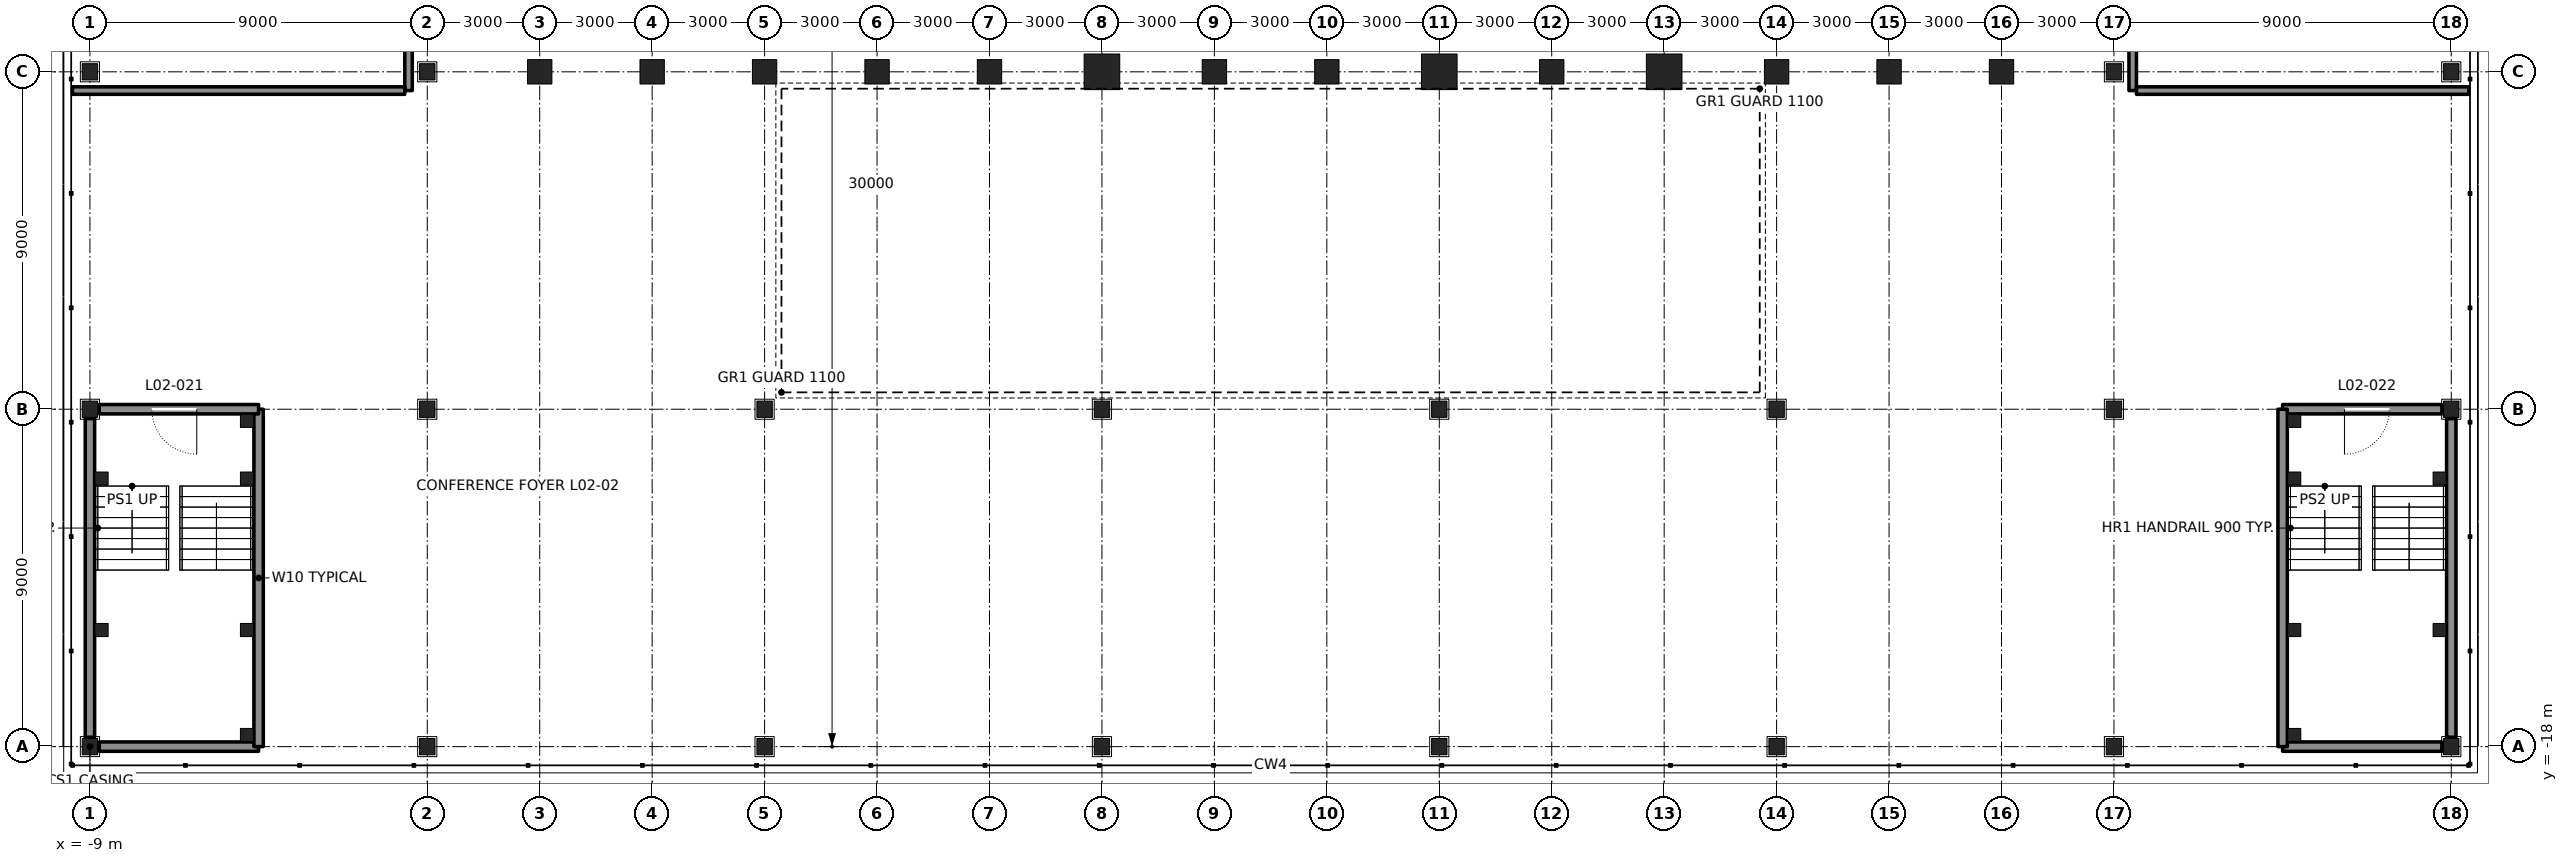
"""IFC4 building model, lengths in metres.
Left out: names, types, materials, properties, quantities, classifications, styles, units other than length and angle.
Written with IfcOpenShell. Run it as: python <this file> out.ifc"""

import sys

from ifc_helpers import new_model, si_unit, direction, frame, frame_2d, origin, origin_2d, place, context, subcontext, project, spatial, rectangle, hollow_rectangle, i_section, extrude, element, fill, save


model = new_model("IFC4")
c1 = context("Model", 3, precision=1e-05, world=origin(), true_north=direction((0.0, 1.0)))
c2 = subcontext(c1, "Body", "Model", "MODEL_VIEW")
j1 = project(units=[si_unit("LENGTHUNIT", "METRE"), si_unit("PLANEANGLEUNIT", "RADIAN")], contexts=[c1])
p1 = place(None, origin())
s1 = spatial("IfcSite", under=j1, at=p1, CompositionType="ELEMENT")
p2 = place(p1, origin())
s2 = spatial("IfcBuilding", under=s1, at=p2, CompositionType="ELEMENT")
p3 = place(p2, frame((0.0, 0.0, 13.5)))
s3 = spatial("IfcBuildingStorey", under=s2, at=p3, CompositionType="ELEMENT", Elevation=13.5)
for number, where, z_axis, x_axis in (
    (1, (3.0, 0.0, 0.0), (0.0, 0.0, 1.0), (0.0, -1.0, 0.0)),
    (2, (6.0, 0.0, 0.0), (0.0, 0.0, 1.0), (0.0, -1.0, 0.0)),
    (3, (9.0, 0.0, 0.0), (0.0, 0.0, 1.0), (0.0, -1.0, 0.0)),
    (4, (12.0, 0.0, 0.0), (0.0, 0.0, 1.0), (0.0, -1.0, 0.0)),
    (5, (15.0, 0.0, 0.0), (0.0, 0.0, 1.0), (0.0, -1.0, 0.0)),
):
    element("IfcColumn", number, at=place(p3, frame(where, z_axis=z_axis, x_axis=x_axis)), inside=s3, PredefinedType="COLUMN", context=c2, shape_type="SweptSolid", body=[
        extrude(hollow_rectangle(XDim=0.65, YDim=0.65, WallThickness=0.065, at=origin_2d()), origin(), (0.0, 0.0, 1.0), 6.0),
    ])
p4 = place(p3, frame((18.0, 0.0, 0.0), z_axis=(0.0, 0.0, 1.0), x_axis=(0.0, -1.0, 0.0)))
e6 = element("IfcColumn", 6, at=p4, inside=s3, PredefinedType="COLUMN", context=c2, shape_type="SweptSolid", body=[
    extrude(hollow_rectangle(XDim=0.95, YDim=0.95, WallThickness=0.11, at=origin_2d()), origin(), (0.0, 0.0, 1.0), 6.0),
])
for number, where, z_axis, x_axis in (
    (7, (21.0, 0.0, 0.0), (0.0, 0.0, 1.0), (0.0, -1.0, 0.0)),
    (8, (24.0, 0.0, 0.0), (0.0, 0.0, 1.0), (0.0, -1.0, 0.0)),
):
    element("IfcColumn", number, at=place(p3, frame(where, z_axis=z_axis, x_axis=x_axis)), inside=s3, PredefinedType="COLUMN", context=c2, shape_type="SweptSolid", body=[
        extrude(hollow_rectangle(XDim=0.65, YDim=0.65, WallThickness=0.065, at=origin_2d()), origin(), (0.0, 0.0, 1.0), 6.0),
    ])
p5 = place(p3, frame((27.0, 0.0, 0.0), z_axis=(0.0, 0.0, 1.0), x_axis=(0.0, -1.0, 0.0)))
e9 = element("IfcColumn", 9, at=p5, inside=s3, PredefinedType="COLUMN", context=c2, shape_type="SweptSolid", body=[
    extrude(hollow_rectangle(XDim=0.95, YDim=0.95, WallThickness=0.11, at=origin_2d()), origin(), (0.0, 0.0, 1.0), 6.0),
])
p6 = place(p3, frame((30.0, 0.0, 0.0), z_axis=(0.0, 0.0, 1.0), x_axis=(0.0, -1.0, 0.0)))
e10 = element("IfcColumn", 10, at=p6, inside=s3, PredefinedType="COLUMN", context=c2, shape_type="SweptSolid", body=[
    extrude(hollow_rectangle(XDim=0.65, YDim=0.65, WallThickness=0.065, at=origin_2d()), origin(), (0.0, 0.0, 1.0), 6.0),
])
p7 = place(p3, frame((33.0, 0.0, 0.0), z_axis=(0.0, 0.0, 1.0), x_axis=(0.0, -1.0, 0.0)))
e11 = element("IfcColumn", 11, at=p7, inside=s3, PredefinedType="COLUMN", context=c2, shape_type="SweptSolid", body=[
    extrude(hollow_rectangle(XDim=0.95, YDim=0.95, WallThickness=0.11, at=origin_2d()), origin(), (0.0, 0.0, 1.0), 6.0),
])
for number, where, z_axis, x_axis in (
    (12, (36.0, 0.0, 0.0), (0.0, 0.0, 1.0), (0.0, -1.0, 0.0)),
    (13, (39.0, 0.0, 0.0), (0.0, 0.0, 1.0), (0.0, -1.0, 0.0)),
    (14, (42.0, 0.0, 0.0), (0.0, 0.0, 1.0), (0.0, -1.0, 0.0)),
):
    element("IfcColumn", number, at=place(p3, frame(where, z_axis=z_axis, x_axis=x_axis)), inside=s3, PredefinedType="COLUMN", context=c2, shape_type="SweptSolid", body=[
        extrude(hollow_rectangle(XDim=0.65, YDim=0.65, WallThickness=0.065, at=origin_2d()), origin(), (0.0, 0.0, 1.0), 6.0),
    ])
for number, where, z_axis, x_axis in (
    (15, (-9.0, -18.0, 0.0), (0.0, 0.0, 1.0), (1.0, 0.0, 0.0)),
    (16, (-9.0, -9.0, 0.0), (0.0, 0.0, 1.0), (1.0, 0.0, 0.0)),
    (17, (-9.0, 0.0, 0.0), (0.0, 0.0, 1.0), (1.0, 0.0, 0.0)),
    (18, (0.0, -18.0, 0.0), (0.0, 0.0, 1.0), (1.0, 0.0, 0.0)),
    (19, (0.0, -9.0, 0.0), (0.0, 0.0, 1.0), (1.0, 0.0, 0.0)),
    (20, (0.0, 0.0, 0.0), (0.0, 0.0, 1.0), (1.0, 0.0, 0.0)),
    (21, (9.0, -18.0, 0.0), (0.0, 0.0, 1.0), (1.0, 0.0, 0.0)),
    (22, (9.0, -9.0, 0.0), (0.0, 0.0, 1.0), (1.0, 0.0, 0.0)),
    (23, (18.0, -18.0, 0.0), (0.0, 0.0, 1.0), (1.0, 0.0, 0.0)),
    (24, (18.0, -9.0, 0.0), (0.0, 0.0, 1.0), (1.0, 0.0, 0.0)),
    (25, (27.0, -18.0, 0.0), (0.0, 0.0, 1.0), (1.0, 0.0, 0.0)),
    (26, (27.0, -9.0, 0.0), (0.0, 0.0, 1.0), (1.0, 0.0, 0.0)),
    (27, (36.0, -18.0, 0.0), (0.0, 0.0, 1.0), (1.0, 0.0, 0.0)),
    (28, (36.0, -9.0, 0.0), (0.0, 0.0, 1.0), (1.0, 0.0, 0.0)),
    (29, (45.0, -18.0, 0.0), (0.0, 0.0, 1.0), (1.0, 0.0, 0.0)),
    (30, (45.0, -9.0, 0.0), (0.0, 0.0, 1.0), (1.0, 0.0, 0.0)),
    (31, (45.0, 0.0, 0.0), (0.0, 0.0, 1.0), (1.0, 0.0, 0.0)),
    (32, (54.0, -18.0, 0.0), (0.0, 0.0, 1.0), (1.0, 0.0, 0.0)),
    (33, (54.0, -9.0, 0.0), (0.0, 0.0, 1.0), (1.0, 0.0, 0.0)),
    (34, (54.0, 0.0, 0.0), (0.0, 0.0, 1.0), (1.0, 0.0, 0.0)),
):
    element("IfcColumn", number, at=place(p3, frame(where, z_axis=z_axis, x_axis=x_axis)), inside=s3, PredefinedType="COLUMN", context=c2, shape_type="SweptSolid", body=[
        extrude(i_section(OverallWidth=0.411, OverallDepth=0.434, WebThickness=0.036, FlangeThickness=0.057, at=origin_2d()), origin(), (0.0, 0.0, 1.0), 6.0),
    ])
p8 = place(p3, frame((-0.5, -0.5, 0.0), z_axis=(0.0, 0.0, 1.0), x_axis=(0.0, 1.0, 0.0)))
e35 = element("IfcWall", 35, at=p8, inside=s3, PredefinedType="PARTITIONING", context=c2, shape_type="SweptSolid", body=[
    extrude(rectangle(XDim=46.018, YDim=0.2, at=frame_2d((23.009, 0.0))), origin(), (0.0, 0.0, 1.0), 5.8),
])
p9 = place(p8, frame((13.1, 0.0, 0.0)))
e36 = element("IfcOpeningElement", 36, at=p9, cuts=e35, PredefinedType="OPENING", context=c2, shape_type="SweptSolid", body=[
    extrude(rectangle(XDim=1.8, YDim=2.4, at=frame_2d((0.9, 1.2))), frame((0.0, 0.11, 0.0), z_axis=(0.0, -1.0, 0.0), x_axis=(1.0, 0.0, 0.0)), (0.0, 0.0, 1.0), 0.22),
])
p10 = place(p3, frame((45.5, -0.5, 0.0), z_axis=(0.0, 0.0, 1.0), x_axis=(0.0, 1.0, 0.0)))
e37 = element("IfcWall", 37, at=p10, inside=s3, PredefinedType="PARTITIONING", context=c2, shape_type="SweptSolid", body=[
    extrude(rectangle(XDim=46.018, YDim=0.2, at=frame_2d((23.009, 0.0))), origin(), (0.0, 0.0, 1.0), 5.8),
])
p11 = place(p10, frame((10.1, 0.0, 0.0)))
e38 = element("IfcOpeningElement", 38, at=p11, cuts=e37, PredefinedType="OPENING", context=c2, shape_type="SweptSolid", body=[
    extrude(rectangle(XDim=1.8, YDim=2.4, at=frame_2d((0.9, 1.2))), frame((0.0, 0.11, 0.0), z_axis=(0.0, -1.0, 0.0), x_axis=(1.0, 0.0, 0.0)), (0.0, 0.0, 1.0), 0.22),
])
for number, where, z_axis, x_axis in (
    (39, (-9.468, -0.5, 0.0), (0.0, 0.0, 1.0), (1.0, 0.0, 0.0)),
    (40, (45.6, -0.5, 0.0), (0.0, 0.0, 1.0), (1.0, 0.0, 0.0)),
):
    element("IfcWall", number, at=place(p3, frame(where, z_axis=z_axis, x_axis=x_axis)), inside=s3, PredefinedType="PARTITIONING", context=c2, shape_type="SweptSolid", body=[
        extrude(rectangle(XDim=8.868, YDim=0.2, at=frame_2d((4.434, 0.0))), origin(), (0.0, 0.0, 1.0), 5.8),
    ])
p12 = place(p3, frame((-8.75, -18.0, 0.0), z_axis=(0.0, 0.0, 1.0), x_axis=(1.0, 0.0, 0.0)))
e41 = element("IfcWall", 41, at=p12, inside=s3, PredefinedType="SOLIDWALL", context=c2, shape_type="SweptSolid", body=[
    extrude(rectangle(XDim=4.25, YDim=0.25, at=frame_2d((2.125, 0.0))), origin(), (0.0, 0.0, 1.0), 4.853),
])
p13 = place(p3, frame((-4.5, -18.0, 0.0), z_axis=(0.0, 0.0, 1.0), x_axis=(0.0, 1.0, 0.0)))
e42 = element("IfcWall", 42, at=p13, inside=s3, PredefinedType="SOLIDWALL", context=c2, shape_type="SweptSolid", body=[
    extrude(rectangle(XDim=9.0, YDim=0.25, at=frame_2d((4.5, 0.0))), origin(), (0.0, 0.0, 1.0), 5.198),
])
p14 = place(p3, frame((-8.75, -9.0, 0.0), z_axis=(0.0, 0.0, 1.0), x_axis=(1.0, 0.0, 0.0)))
e43 = element("IfcWall", 43, at=p14, inside=s3, PredefinedType="SOLIDWALL", context=c2, shape_type="SweptSolid", body=[
    extrude(rectangle(XDim=4.25, YDim=0.25, at=frame_2d((2.125, 0.0))), origin(), (0.0, 0.0, 1.0), 4.853),
])
p15 = place(p14, frame((1.4, 0.0, 0.0)))
e44 = element("IfcOpeningElement", 44, at=p15, cuts=e43, PredefinedType="OPENING", context=c2, shape_type="SweptSolid", body=[
    extrude(rectangle(XDim=1.2, YDim=2.1, at=frame_2d((0.6, 1.05))), frame((0.0, 0.135, 0.0), z_axis=(0.0, -1.0, 0.0), x_axis=(1.0, 0.0, 0.0)), (0.0, 0.0, 1.0), 0.27),
])
p16 = place(p3, frame((-9.0, -17.75, 0.0), z_axis=(0.0, 0.0, 1.0), x_axis=(0.0, 1.0, 0.0)))
e45 = element("IfcWall", 45, at=p16, inside=s3, PredefinedType="SOLIDWALL", context=c2, shape_type="SweptSolid", body=[
    extrude(rectangle(XDim=8.5, YDim=0.25, at=frame_2d((4.25, 0.0))), origin(), (0.0, 0.0, 1.0), 4.853),
])
p17 = place(p3, frame((49.5, -18.0, 0.0), z_axis=(0.0, 0.0, 1.0), x_axis=(1.0, 0.0, 0.0)))
e46 = element("IfcWall", 46, at=p17, inside=s3, PredefinedType="SOLIDWALL", context=c2, shape_type="SweptSolid", body=[
    extrude(rectangle(XDim=4.25, YDim=0.25, at=frame_2d((2.125, 0.0))), origin(), (0.0, 0.0, 1.0), 4.853),
])
p18 = place(p3, frame((54.0, -17.75, 0.0), z_axis=(0.0, 0.0, 1.0), x_axis=(0.0, 1.0, 0.0)))
e47 = element("IfcWall", 47, at=p18, inside=s3, PredefinedType="SOLIDWALL", context=c2, shape_type="SweptSolid", body=[
    extrude(rectangle(XDim=8.5, YDim=0.25, at=frame_2d((4.25, 0.0))), origin(), (0.0, 0.0, 1.0), 4.853),
])
p19 = place(p3, frame((49.5, -9.0, 0.0), z_axis=(0.0, 0.0, 1.0), x_axis=(1.0, 0.0, 0.0)))
e48 = element("IfcWall", 48, at=p19, inside=s3, PredefinedType="SOLIDWALL", context=c2, shape_type="SweptSolid", body=[
    extrude(rectangle(XDim=4.25, YDim=0.25, at=frame_2d((2.125, 0.0))), origin(), (0.0, 0.0, 1.0), 4.853),
])
p20 = place(p19, frame((1.65, 0.0, 0.0)))
e49 = element("IfcOpeningElement", 49, at=p20, cuts=e48, PredefinedType="OPENING", context=c2, shape_type="SweptSolid", body=[
    extrude(rectangle(XDim=1.2, YDim=2.1, at=frame_2d((0.6, 1.05))), frame((0.0, 0.135, 0.0), z_axis=(0.0, -1.0, 0.0), x_axis=(1.0, 0.0, 0.0)), (0.0, 0.0, 1.0), 0.27),
])
p21 = place(p3, frame((49.5, -18.0, 0.0), z_axis=(0.0, 0.0, 1.0), x_axis=(0.0, 1.0, 0.0)))
e50 = element("IfcWall", 50, at=p21, inside=s3, PredefinedType="SOLIDWALL", context=c2, shape_type="SweptSolid", body=[
    extrude(rectangle(XDim=9.0, YDim=0.25, at=frame_2d((4.5, 0.0))), origin(), (0.0, 0.0, 1.0), 5.198),
])
for number, where, z_axis, x_axis in (
    (51, (-4.81, -17.69, 0.0), (0.0, 0.0, 1.0), (1.0, 0.0, 0.0)),
    (52, (-8.69, -14.89, 0.0), (0.0, 0.0, 1.0), (1.0, 0.0, 0.0)),
    (53, (-4.81, -14.89, 0.0), (0.0, 0.0, 1.0), (1.0, 0.0, 0.0)),
    (54, (-8.69, -10.85, 0.0), (0.0, 0.0, 1.0), (1.0, 0.0, 0.0)),
    (55, (-4.81, -10.85, 0.0), (0.0, 0.0, 1.0), (1.0, 0.0, 0.0)),
    (56, (-4.81, -9.31, 0.0), (0.0, 0.0, 1.0), (1.0, 0.0, 0.0)),
    (57, (49.81, -17.69, 0.0), (0.0, 0.0, 1.0), (1.0, 0.0, 0.0)),
    (58, (49.81, -14.89, 0.0), (0.0, 0.0, 1.0), (1.0, 0.0, 0.0)),
    (59, (53.69, -14.89, 0.0), (0.0, 0.0, 1.0), (1.0, 0.0, 0.0)),
    (60, (49.81, -10.85, 0.0), (0.0, 0.0, 1.0), (1.0, 0.0, 0.0)),
    (61, (53.69, -10.85, 0.0), (0.0, 0.0, 1.0), (1.0, 0.0, 0.0)),
    (62, (49.81, -9.31, 0.0), (0.0, 0.0, 1.0), (1.0, 0.0, 0.0)),
):
    element("IfcColumn", number, at=place(p3, frame(where, z_axis=z_axis, x_axis=x_axis)), inside=s3, PredefinedType="COLUMN", context=c2, shape_type="SweptSolid", body=[
        extrude(hollow_rectangle(XDim=0.35, YDim=0.35, WallThickness=0.035, at=origin_2d()), origin(), (0.0, 0.0, 1.0), 5.8),
    ])
p22 = place(p15, frame((1.2, 0.0, 0.0), z_axis=(0.0, 0.0, 1.0), x_axis=(-1.0, 0.0, 0.0)))
e63 = element("IfcDoor", 63, at=p22, inside=s3, OperationType="SINGLE_SWING_LEFT", PredefinedType="DOOR", context=c2, shape_type="SweptSolid", body=[
    extrude(rectangle(XDim=1.2, YDim=2.1, at=frame_2d((0.6, 1.05))), frame((0.0, 0.025, 0.0), z_axis=(0.0, -1.0, 0.0), x_axis=(1.0, 0.0, 0.0)), (0.0, 0.0, 1.0), 0.05),
])
fill(e44, e63)
p23 = place(p20, frame((1.2, 0.0, 0.0), z_axis=(0.0, 0.0, 1.0), x_axis=(-1.0, 0.0, 0.0)))
e64 = element("IfcDoor", 64, at=p23, inside=s3, OperationType="SINGLE_SWING_RIGHT", PredefinedType="DOOR", context=c2, shape_type="SweptSolid", body=[
    extrude(rectangle(XDim=1.2, YDim=2.1, at=frame_2d((0.6, 1.05))), frame((0.0, 0.025, 0.0), z_axis=(0.0, -1.0, 0.0), x_axis=(1.0, 0.0, 0.0)), (0.0, 0.0, 1.0), 0.05),
])
fill(e49, e64)
save(model, sys.argv[1])
